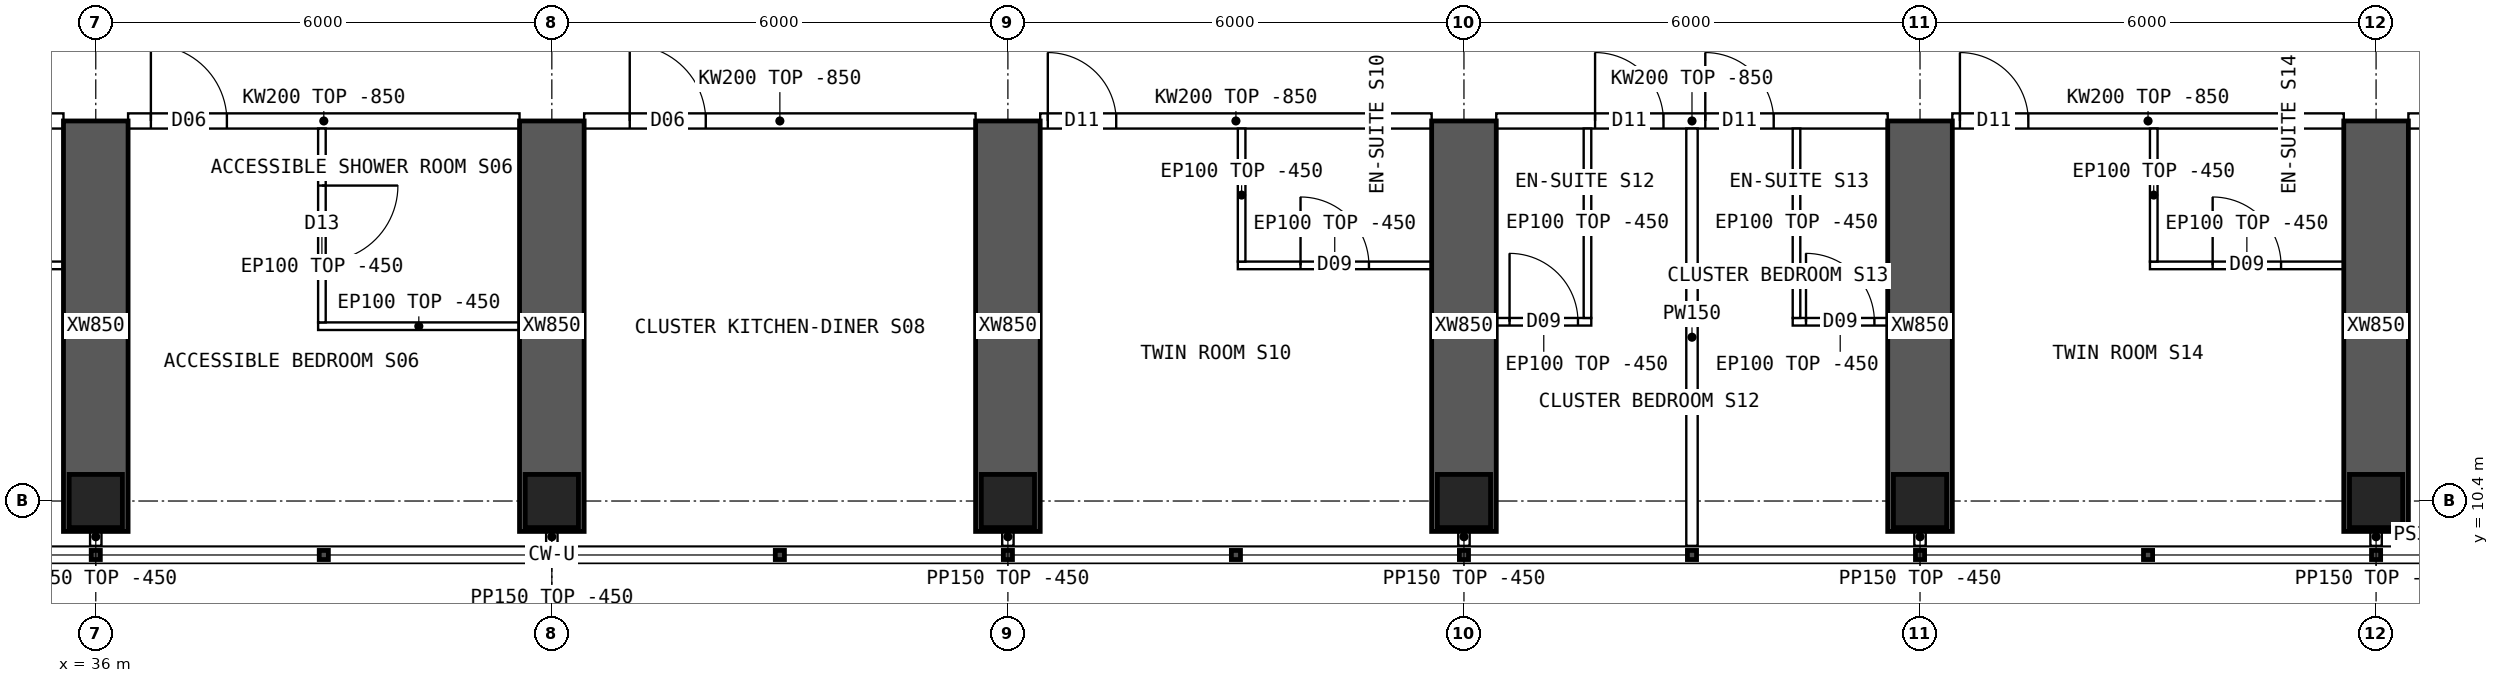
"""IFC4 building model, lengths in metres.
Left out: names, types, materials, properties, quantities, classifications, styles, units other than length and angle.
Written with IfcOpenShell. Run it as: python <this file> out.ifc"""

import sys

from ifc_helpers import new_model, si_unit, direction, frame, frame_2d, origin, origin_2d, place, context, subcontext, project, spatial, polyline, rectangle, hollow_rectangle, outline, extrude, element, fill, save


model = new_model("IFC4")
c1 = context("Model", 3, precision=1e-05, world=origin(), true_north=direction((0.0, 1.0)))
c2 = subcontext(c1, "Body", "Model", "MODEL_VIEW")
j1 = project(units=[si_unit("LENGTHUNIT", "METRE"), si_unit("PLANEANGLEUNIT", "RADIAN")], contexts=[c1])
p1 = place(None, origin())
s1 = spatial("IfcSite", under=j1, at=p1, CompositionType="ELEMENT")
p2 = place(p1, origin())
s2 = spatial("IfcBuilding", under=s1, at=p2, CompositionType="ELEMENT")
p3 = place(p2, frame((0.0, 0.0, 189.85)))
s3 = spatial("IfcBuildingStorey", under=s2, at=p3, CompositionType="ELEMENT", Elevation=189.85)
for number, where, z_axis, x_axis in (
    (1, (36.0, 10.4, 0.0), (0.0, 0.0, 1.0), (1.0, 0.0, 0.0)),
    (2, (42.0, 10.4, 0.0), (0.0, 0.0, 1.0), (1.0, 0.0, 0.0)),
    (3, (48.0, 10.4, 0.0), (0.0, 0.0, 1.0), (1.0, 0.0, 0.0)),
    (4, (54.0, 10.4, 0.0), (0.0, 0.0, 1.0), (1.0, 0.0, 0.0)),
    (5, (60.0, 10.4, 0.0), (0.0, 0.0, 1.0), (1.0, 0.0, 0.0)),
    (6, (66.0, 10.4, 0.0), (0.0, 0.0, 1.0), (1.0, 0.0, 0.0)),
):
    element("IfcColumn", number, at=place(p3, frame(where, z_axis=z_axis, x_axis=x_axis)), inside=s3, PredefinedType="COLUMN", context=c2, shape_type="SweptSolid", body=[
        extrude(hollow_rectangle(XDim=0.7, YDim=0.7, WallThickness=0.07, at=origin_2d()), origin(), (0.0, 0.0, 1.0), 3.75),
    ])
for number, where, z_axis, x_axis in (
    (7, (36.0, 10.0, 0.0), (0.0, 0.0, 1.0), (0.0, 1.0, 0.0)),
    (8, (42.0, 10.0, 0.0), (0.0, 0.0, 1.0), (0.0, 1.0, 0.0)),
    (9, (48.0, 10.0, 0.0), (0.0, 0.0, 1.0), (0.0, 1.0, 0.0)),
    (10, (54.0, 10.0, 0.0), (0.0, 0.0, 1.0), (0.0, 1.0, 0.0)),
    (11, (60.0, 10.0, 0.0), (0.0, 0.0, 1.0), (0.0, 1.0, 0.0)),
    (12, (66.0, 10.0, 0.0), (0.0, 0.0, 1.0), (0.0, 1.0, 0.0)),
):
    element("IfcWall", number, at=place(p3, frame(where, z_axis=z_axis, x_axis=x_axis)), inside=s3, PredefinedType="SHEAR", context=c2, shape_type="SweptSolid", body=[
        extrude(rectangle(XDim=5.4, YDim=0.85, at=frame_2d((2.7, 0.0))), origin(), (0.0, 0.0, 1.0), 3.75),
    ])
p4 = place(p3, frame((66.8, 9.95, 0.0), z_axis=(0.0, 0.0, 1.0), x_axis=(-1.0, 0.0, 0.0)))
e13 = element("IfcWall", 13, at=p4, inside=s3, PredefinedType="SOLIDWALL", context=c2, shape_type="SweptSolid", body=[
    extrude(rectangle(XDim=0.375, YDim=0.3, at=frame_2d((0.188, 0.0))), origin(), (0.0, 0.0, 1.0), 3.3),
])
p5 = place(p3, frame((30.425, 15.4, 0.0), z_axis=(0.0, 0.0, 1.0), x_axis=(1.0, 0.0, 0.0)))
e14 = element("IfcWall", 14, at=p5, inside=s3, PredefinedType="SOLIDWALL", context=c2, shape_type="SweptSolid", body=[
    extrude(outline(polyline([(0.0, 0.0), (5.15, 0.0), (5.15, 2.9), (0.0, 2.9), (0.0, 0.0)])), frame((0.0, 0.1, 0.0), z_axis=(0.0, -1.0, 0.0), x_axis=(1.0, 0.0, 0.0)), (0.0, 0.0, 1.0), 0.2),
])
p6 = place(p5, frame((0.1, 0.0, 0.0)))
e15 = element("IfcOpeningElement", 15, at=p6, cuts=e14, PredefinedType="OPENING", context=c2, shape_type="SweptSolid", body=[
    extrude(rectangle(XDim=0.9, YDim=2.1, at=frame_2d((0.45, 1.05))), frame((0.0, 0.11, 0.0), z_axis=(0.0, -1.0, 0.0), x_axis=(1.0, 0.0, 0.0)), (0.0, 0.0, 1.0), 0.22),
])
p7 = place(p3, frame((36.425, 15.4, 0.0), z_axis=(0.0, 0.0, 1.0), x_axis=(1.0, 0.0, 0.0)))
e16 = element("IfcWall", 16, at=p7, inside=s3, PredefinedType="SOLIDWALL", context=c2, shape_type="SweptSolid", body=[
    extrude(outline(polyline([(0.0, 0.0), (5.15, 0.0), (5.15, 2.9), (0.0, 2.9), (0.0, 0.0)])), frame((0.0, 0.1, 0.0), z_axis=(0.0, -1.0, 0.0), x_axis=(1.0, 0.0, 0.0)), (0.0, 0.0, 1.0), 0.2),
])
p8 = place(p7, frame((0.3, 0.0, 0.0)))
e17 = element("IfcOpeningElement", 17, at=p8, cuts=e16, PredefinedType="OPENING", context=c2, shape_type="SweptSolid", body=[
    extrude(rectangle(XDim=1.0, YDim=2.1, at=frame_2d((0.5, 1.05))), frame((0.0, 0.11, 0.0), z_axis=(0.0, -1.0, 0.0), x_axis=(1.0, 0.0, 0.0)), (0.0, 0.0, 1.0), 0.22),
])
p9 = place(p3, frame((42.425, 15.4, 0.0), z_axis=(0.0, 0.0, 1.0), x_axis=(1.0, 0.0, 0.0)))
e18 = element("IfcWall", 18, at=p9, inside=s3, PredefinedType="SOLIDWALL", context=c2, shape_type="SweptSolid", body=[
    extrude(outline(polyline([(0.0, 0.0), (5.15, 0.0), (5.15, 2.9), (0.0, 2.9), (0.0, 0.0)])), frame((0.0, 0.1, 0.0), z_axis=(0.0, -1.0, 0.0), x_axis=(1.0, 0.0, 0.0)), (0.0, 0.0, 1.0), 0.2),
])
p10 = place(p9, frame((0.6, 0.0, 0.0)))
e19 = element("IfcOpeningElement", 19, at=p10, cuts=e18, PredefinedType="OPENING", context=c2, shape_type="SweptSolid", body=[
    extrude(rectangle(XDim=1.0, YDim=2.1, at=frame_2d((0.5, 1.05))), frame((0.0, 0.11, 0.0), z_axis=(0.0, -1.0, 0.0), x_axis=(1.0, 0.0, 0.0)), (0.0, 0.0, 1.0), 0.22),
])
p11 = place(p3, frame((48.425, 15.4, 0.0), z_axis=(0.0, 0.0, 1.0), x_axis=(1.0, 0.0, 0.0)))
e20 = element("IfcWall", 20, at=p11, inside=s3, PredefinedType="SOLIDWALL", context=c2, shape_type="SweptSolid", body=[
    extrude(outline(polyline([(0.0, 0.0), (5.15, 0.0), (5.15, 2.9), (0.0, 2.9), (0.0, 0.0)])), frame((0.0, 0.1, 0.0), z_axis=(0.0, -1.0, 0.0), x_axis=(1.0, 0.0, 0.0)), (0.0, 0.0, 1.0), 0.2),
])
p12 = place(p11, frame((0.1, 0.0, 0.0)))
e21 = element("IfcOpeningElement", 21, at=p12, cuts=e20, PredefinedType="OPENING", context=c2, shape_type="SweptSolid", body=[
    extrude(rectangle(XDim=0.9, YDim=2.1, at=frame_2d((0.45, 1.05))), frame((0.0, 0.11, 0.0), z_axis=(0.0, -1.0, 0.0), x_axis=(1.0, 0.0, 0.0)), (0.0, 0.0, 1.0), 0.22),
])
p13 = place(p3, frame((54.425, 15.4, 0.0), z_axis=(0.0, 0.0, 1.0), x_axis=(1.0, 0.0, 0.0)))
e22 = element("IfcWall", 22, at=p13, inside=s3, PredefinedType="SOLIDWALL", context=c2, shape_type="SweptSolid", body=[
    extrude(outline(polyline([(0.0, 0.0), (5.15, 0.0), (5.15, 2.9), (0.0, 2.9), (0.0, 0.0)])), frame((0.0, 0.1, 0.0), z_axis=(0.0, -1.0, 0.0), x_axis=(1.0, 0.0, 0.0)), (0.0, 0.0, 1.0), 0.2),
])
p14 = place(p13, frame((1.3, 0.0, 0.0)))
e23 = element("IfcOpeningElement", 23, at=p14, cuts=e22, PredefinedType="OPENING", context=c2, shape_type="SweptSolid", body=[
    extrude(rectangle(XDim=0.9, YDim=2.1, at=frame_2d((0.45, 1.05))), frame((0.0, 0.11, 0.0), z_axis=(0.0, -1.0, 0.0), x_axis=(1.0, 0.0, 0.0)), (0.0, 0.0, 1.0), 0.22),
])
p15 = place(p13, frame((2.75, 0.0, 0.0)))
e24 = element("IfcOpeningElement", 24, at=p15, cuts=e22, PredefinedType="OPENING", context=c2, shape_type="SweptSolid", body=[
    extrude(rectangle(XDim=0.9, YDim=2.1, at=frame_2d((0.45, 1.05))), frame((0.0, 0.11, 0.0), z_axis=(0.0, -1.0, 0.0), x_axis=(1.0, 0.0, 0.0)), (0.0, 0.0, 1.0), 0.22),
])
p16 = place(p3, frame((60.425, 15.4, 0.0), z_axis=(0.0, 0.0, 1.0), x_axis=(1.0, 0.0, 0.0)))
e25 = element("IfcWall", 25, at=p16, inside=s3, PredefinedType="SOLIDWALL", context=c2, shape_type="SweptSolid", body=[
    extrude(outline(polyline([(0.0, 0.0), (5.15, 0.0), (5.15, 2.9), (0.0, 2.9), (0.0, 0.0)])), frame((0.0, 0.1, 0.0), z_axis=(0.0, -1.0, 0.0), x_axis=(1.0, 0.0, 0.0)), (0.0, 0.0, 1.0), 0.2),
])
p17 = place(p16, frame((0.1, 0.0, 0.0)))
e26 = element("IfcOpeningElement", 26, at=p17, cuts=e25, PredefinedType="OPENING", context=c2, shape_type="SweptSolid", body=[
    extrude(rectangle(XDim=0.9, YDim=2.1, at=frame_2d((0.45, 1.05))), frame((0.0, 0.11, 0.0), z_axis=(0.0, -1.0, 0.0), x_axis=(1.0, 0.0, 0.0)), (0.0, 0.0, 1.0), 0.22),
])
p18 = place(p3, frame((66.425, 15.4, 0.0), z_axis=(0.0, 0.0, 1.0), x_axis=(1.0, 0.0, 0.0)))
e27 = element("IfcWall", 27, at=p18, inside=s3, PredefinedType="SOLIDWALL", context=c2, shape_type="SweptSolid", body=[
    extrude(rectangle(XDim=1.975, YDim=0.2, at=frame_2d((0.987, 0.0))), origin(), (0.0, 0.0, 1.0), 3.3),
])
p19 = place(p18, frame((0.2, 0.0, 0.0)))
e28 = element("IfcOpeningElement", 28, at=p19, cuts=e27, PredefinedType="OPENING", context=c2, shape_type="SweptSolid", body=[
    extrude(rectangle(XDim=0.9, YDim=2.1, at=frame_2d((0.45, 1.05))), frame((0.0, 0.11, 0.0), z_axis=(0.0, -1.0, 0.0), x_axis=(1.0, 0.0, 0.0)), (0.0, 0.0, 1.0), 0.22),
])
p20 = place(p3, frame((35.575, 13.5, 0.0), z_axis=(0.0, 0.0, 1.0), x_axis=(-1.0, 0.0, 0.0)))
e29 = element("IfcWall", 29, at=p20, inside=s3, PredefinedType="PARTITIONING", context=c2, shape_type="SweptSolid", body=[
    extrude(rectangle(XDim=2.55, YDim=0.1, at=frame_2d((1.275, 0.0))), origin(), (0.0, 0.0, 1.0), 3.3),
])
p21 = place(p20, frame((0.825, 0.0, 0.0)))
e30 = element("IfcOpeningElement", 30, at=p21, cuts=e29, PredefinedType="OPENING", context=c2, shape_type="SweptSolid", body=[
    extrude(rectangle(XDim=0.9, YDim=2.1, at=frame_2d((0.45, 1.05))), frame((0.0, 0.06, 0.0), z_axis=(0.0, -1.0, 0.0), x_axis=(1.0, 0.0, 0.0)), (0.0, 0.0, 1.0), 0.12),
])
p22 = place(p3, frame((38.925, 12.7, 0.0), z_axis=(0.0, 0.0, 1.0), x_axis=(1.0, 0.0, 0.0)))
e31 = element("IfcWall", 31, at=p22, inside=s3, PredefinedType="PARTITIONING", context=c2, shape_type="SweptSolid", body=[
    extrude(rectangle(XDim=2.65, YDim=0.1, at=frame_2d((1.325, 0.0))), origin(), (0.0, 0.0, 1.0), 3.3),
])
p23 = place(p3, frame((38.975, 12.75, 0.0), z_axis=(0.0, 0.0, 1.0), x_axis=(0.0, 1.0, 0.0)))
e32 = element("IfcWall", 32, at=p23, inside=s3, PredefinedType="PARTITIONING", context=c2, shape_type="SweptSolid", body=[
    extrude(outline(polyline([(0.0, 0.0), (2.55, 0.0), (2.55, 2.9), (2.502, 2.9), (2.5, 3.3), (0.0, 3.3), (0.0, 0.0)])), frame((0.0, 0.05, 0.0), z_axis=(0.0, -1.0, 0.0), x_axis=(1.0, 0.0, 0.0)), (0.0, 0.0, 1.0), 0.1),
])
p24 = place(p23, frame((0.8, 0.0, 0.0)))
e33 = element("IfcOpeningElement", 33, at=p24, cuts=e32, PredefinedType="OPENING", context=c2, shape_type="SweptSolid", body=[
    extrude(rectangle(XDim=1.0, YDim=2.1, at=frame_2d((0.5, 1.05))), frame((0.0, 0.06, 0.0), z_axis=(0.0, -1.0, 0.0), x_axis=(1.0, 0.0, 0.0)), (0.0, 0.0, 1.0), 0.12),
])
p25 = place(p3, frame((53.575, 13.5, 0.0), z_axis=(0.0, 0.0, 1.0), x_axis=(-1.0, 0.0, 0.0)))
e34 = element("IfcWall", 34, at=p25, inside=s3, PredefinedType="PARTITIONING", context=c2, shape_type="SweptSolid", body=[
    extrude(rectangle(XDim=2.55, YDim=0.1, at=frame_2d((1.275, 0.0))), origin(), (0.0, 0.0, 1.0), 3.3),
])
p26 = place(p25, frame((0.825, 0.0, 0.0)))
e35 = element("IfcOpeningElement", 35, at=p26, cuts=e34, PredefinedType="OPENING", context=c2, shape_type="SweptSolid", body=[
    extrude(rectangle(XDim=0.9, YDim=2.1, at=frame_2d((0.45, 1.05))), frame((0.0, 0.06, 0.0), z_axis=(0.0, -1.0, 0.0), x_axis=(1.0, 0.0, 0.0)), (0.0, 0.0, 1.0), 0.12),
])
p27 = place(p3, frame((51.075, 13.55, 0.0), z_axis=(0.0, 0.0, 1.0), x_axis=(0.0, 1.0, 0.0)))
e36 = element("IfcWall", 36, at=p27, inside=s3, PredefinedType="PARTITIONING", context=c2, shape_type="SweptSolid", body=[
    extrude(outline(polyline([(0.0, 0.0), (1.75, 0.0), (1.75, 2.9), (1.702, 2.9), (1.7, 3.3), (0.0, 3.3), (0.0, 0.0)])), frame((0.0, 0.05, 0.0), z_axis=(0.0, -1.0, 0.0), x_axis=(1.0, 0.0, 0.0)), (0.0, 0.0, 1.0), 0.1),
])
p28 = place(p3, frame((57.0, 9.81, 0.0), z_axis=(0.0, 0.0, 1.0), x_axis=(0.0, 1.0, 0.0)))
e37 = element("IfcWall", 37, at=p28, inside=s3, PredefinedType="PARTITIONING", context=c2, shape_type="SweptSolid", body=[
    extrude(outline(polyline([(0.0, 0.0), (5.49, 0.0), (5.49, 2.9), (5.442, 2.9), (5.44, 3.3), (0.792, 3.3), (0.79, 2.9), (0.392, 2.9), (0.39, 3.3), (0.0, 3.3), (0.0, 0.0)])), frame((0.0, 0.075, 0.0), z_axis=(0.0, -1.0, 0.0), x_axis=(1.0, 0.0, 0.0)), (0.0, 0.0, 1.0), 0.15),
])
p29 = place(p3, frame((55.675, 12.758, 0.0), z_axis=(0.0, 0.0, 1.0), x_axis=(-1.0, 0.0, 0.0)))
e38 = element("IfcWall", 38, at=p29, inside=s3, PredefinedType="PARTITIONING", context=c2, shape_type="SweptSolid", body=[
    extrude(rectangle(XDim=1.25, YDim=0.1, at=frame_2d((0.625, 0.0))), origin(), (0.0, 0.0, 1.0), 3.3),
])
p30 = place(p29, frame((0.175, 0.0, 0.0)))
e39 = element("IfcOpeningElement", 39, at=p30, cuts=e38, PredefinedType="OPENING", context=c2, shape_type="SweptSolid", body=[
    extrude(rectangle(XDim=0.9, YDim=2.1, at=frame_2d((0.45, 1.05))), frame((0.0, 0.06, 0.0), z_axis=(0.0, -1.0, 0.0), x_axis=(1.0, 0.0, 0.0)), (0.0, 0.0, 1.0), 0.12),
])
p31 = place(p3, frame((55.625, 12.808, 0.0), z_axis=(0.0, 0.0, 1.0), x_axis=(0.0, 1.0, 0.0)))
e40 = element("IfcWall", 40, at=p31, inside=s3, PredefinedType="PARTITIONING", context=c2, shape_type="SweptSolid", body=[
    extrude(outline(polyline([(0.0, 0.0), (2.492, 0.0), (2.492, 2.9), (2.444, 2.9), (2.442, 3.3), (0.0, 3.3), (0.0, 0.0)])), frame((0.0, 0.05, 0.0), z_axis=(0.0, -1.0, 0.0), x_axis=(1.0, 0.0, 0.0)), (0.0, 0.0, 1.0), 0.1),
])
p32 = place(p3, frame((59.575, 12.758, 0.0), z_axis=(0.0, 0.0, 1.0), x_axis=(-1.0, 0.0, 0.0)))
e41 = element("IfcWall", 41, at=p32, inside=s3, PredefinedType="PARTITIONING", context=c2, shape_type="SweptSolid", body=[
    extrude(rectangle(XDim=1.25, YDim=0.1, at=frame_2d((0.625, 0.0))), origin(), (0.0, 0.0, 1.0), 3.3),
])
p33 = place(p32, frame((0.175, 0.0, 0.0)))
e42 = element("IfcOpeningElement", 42, at=p33, cuts=e41, PredefinedType="OPENING", context=c2, shape_type="SweptSolid", body=[
    extrude(rectangle(XDim=0.9, YDim=2.1, at=frame_2d((0.45, 1.05))), frame((0.0, 0.06, 0.0), z_axis=(0.0, -1.0, 0.0), x_axis=(1.0, 0.0, 0.0)), (0.0, 0.0, 1.0), 0.12),
])
p34 = place(p3, frame((58.375, 12.808, 0.0), z_axis=(0.0, 0.0, 1.0), x_axis=(0.0, 1.0, 0.0)))
e43 = element("IfcWall", 43, at=p34, inside=s3, PredefinedType="PARTITIONING", context=c2, shape_type="SweptSolid", body=[
    extrude(outline(polyline([(0.0, 0.0), (2.492, 0.0), (2.492, 2.9), (2.444, 2.9), (2.442, 3.3), (0.0, 3.3), (0.0, 0.0)])), frame((0.0, 0.05, 0.0), z_axis=(0.0, -1.0, 0.0), x_axis=(1.0, 0.0, 0.0)), (0.0, 0.0, 1.0), 0.1),
])
p35 = place(p3, frame((65.575, 13.5, 0.0), z_axis=(0.0, 0.0, 1.0), x_axis=(-1.0, 0.0, 0.0)))
e44 = element("IfcWall", 44, at=p35, inside=s3, PredefinedType="PARTITIONING", context=c2, shape_type="SweptSolid", body=[
    extrude(rectangle(XDim=2.55, YDim=0.1, at=frame_2d((1.275, 0.0))), origin(), (0.0, 0.0, 1.0), 3.3),
])
p36 = place(p35, frame((0.825, 0.0, 0.0)))
e45 = element("IfcOpeningElement", 45, at=p36, cuts=e44, PredefinedType="OPENING", context=c2, shape_type="SweptSolid", body=[
    extrude(rectangle(XDim=0.9, YDim=2.1, at=frame_2d((0.45, 1.05))), frame((0.0, 0.06, 0.0), z_axis=(0.0, -1.0, 0.0), x_axis=(1.0, 0.0, 0.0)), (0.0, 0.0, 1.0), 0.12),
])
p37 = place(p3, frame((63.075, 13.55, 0.0), z_axis=(0.0, 0.0, 1.0), x_axis=(0.0, 1.0, 0.0)))
e46 = element("IfcWall", 46, at=p37, inside=s3, PredefinedType="PARTITIONING", context=c2, shape_type="SweptSolid", body=[
    extrude(outline(polyline([(0.0, 0.0), (1.75, 0.0), (1.75, 2.9), (1.702, 2.9), (1.7, 3.3), (0.0, 3.3), (0.0, 0.0)])), frame((0.0, 0.05, 0.0), z_axis=(0.0, -1.0, 0.0), x_axis=(1.0, 0.0, 0.0)), (0.0, 0.0, 1.0), 0.1),
])
for number, where, z_axis, x_axis in (
    (47, (36.0, 10.05, 0.0), (0.0, 0.0, 1.0), (0.0, -1.0, 0.0)),
    (48, (42.0, 10.05, 0.0), (0.0, 0.0, 1.0), (0.0, -1.0, 0.0)),
    (49, (48.0, 10.05, 0.0), (0.0, 0.0, 1.0), (0.0, -1.0, 0.0)),
    (50, (54.0, 10.05, 0.0), (0.0, 0.0, 1.0), (0.0, -1.0, 0.0)),
    (51, (60.0, 10.05, 0.0), (0.0, 0.0, 1.0), (0.0, -1.0, 0.0)),
    (52, (66.0, 10.05, 0.0), (0.0, 0.0, 1.0), (0.0, -1.0, 0.0)),
):
    element("IfcWall", number, at=place(p3, frame(where, z_axis=z_axis, x_axis=x_axis)), inside=s3, PredefinedType="PARTITIONING", context=c2, shape_type="SweptSolid", body=[
        extrude(rectangle(XDim=0.24, YDim=0.15, at=frame_2d((0.12, 0.0))), origin(), (0.0, 0.0, 1.0), 3.3),
    ])
p38 = place(p24, origin())
e53 = element("IfcDoor", 53, at=p38, inside=s3, OperationType="SINGLE_SWING_RIGHT", PredefinedType="DOOR", context=c2, shape_type="SweptSolid", body=[
    extrude(rectangle(XDim=1.0, YDim=2.1, at=frame_2d((0.5, 1.05))), frame((0.0, 0.025, 0.0), z_axis=(0.0, -1.0, 0.0), x_axis=(1.0, 0.0, 0.0)), (0.0, 0.0, 1.0), 0.05),
])
fill(e33, e53)
p39 = place(p8, origin())
e54 = element("IfcDoor", 54, at=p39, inside=s3, OperationType="SINGLE_SWING_LEFT", PredefinedType="DOOR", context=c2, shape_type="SweptSolid", body=[
    extrude(rectangle(XDim=1.0, YDim=2.1, at=frame_2d((0.5, 1.05))), frame((0.0, 0.025, 0.0), z_axis=(0.0, -1.0, 0.0), x_axis=(1.0, 0.0, 0.0)), (0.0, 0.0, 1.0), 0.05),
])
fill(e17, e54)
p40 = place(p10, origin())
e55 = element("IfcDoor", 55, at=p40, inside=s3, OperationType="SINGLE_SWING_LEFT", PredefinedType="DOOR", context=c2, shape_type="SweptSolid", body=[
    extrude(rectangle(XDim=1.0, YDim=2.1, at=frame_2d((0.5, 1.05))), frame((0.0, 0.025, 0.0), z_axis=(0.0, -1.0, 0.0), x_axis=(1.0, 0.0, 0.0)), (0.0, 0.0, 1.0), 0.05),
])
fill(e19, e55)
p41 = place(p26, origin())
e56 = element("IfcDoor", 56, at=p41, inside=s3, OperationType="SINGLE_SWING_RIGHT", PredefinedType="DOOR", context=c2, shape_type="SweptSolid", body=[
    extrude(rectangle(XDim=0.9, YDim=2.1, at=frame_2d((0.45, 1.05))), frame((0.0, 0.025, 0.0), z_axis=(0.0, -1.0, 0.0), x_axis=(1.0, 0.0, 0.0)), (0.0, 0.0, 1.0), 0.05),
])
fill(e35, e56)
p42 = place(p12, origin())
e57 = element("IfcDoor", 57, at=p42, inside=s3, OperationType="SINGLE_SWING_LEFT", PredefinedType="DOOR", context=c2, shape_type="SweptSolid", body=[
    extrude(rectangle(XDim=0.9, YDim=2.1, at=frame_2d((0.45, 1.05))), frame((0.0, 0.025, 0.0), z_axis=(0.0, -1.0, 0.0), x_axis=(1.0, 0.0, 0.0)), (0.0, 0.0, 1.0), 0.05),
])
fill(e21, e57)
p43 = place(p30, origin())
e58 = element("IfcDoor", 58, at=p43, inside=s3, OperationType="SINGLE_SWING_RIGHT", PredefinedType="DOOR", context=c2, shape_type="SweptSolid", body=[
    extrude(rectangle(XDim=0.9, YDim=2.1, at=frame_2d((0.45, 1.05))), frame((0.0, 0.025, 0.0), z_axis=(0.0, -1.0, 0.0), x_axis=(1.0, 0.0, 0.0)), (0.0, 0.0, 1.0), 0.05),
])
fill(e39, e58)
p44 = place(p14, origin())
e59 = element("IfcDoor", 59, at=p44, inside=s3, OperationType="SINGLE_SWING_LEFT", PredefinedType="DOOR", context=c2, shape_type="SweptSolid", body=[
    extrude(rectangle(XDim=0.9, YDim=2.1, at=frame_2d((0.45, 1.05))), frame((0.0, 0.025, 0.0), z_axis=(0.0, -1.0, 0.0), x_axis=(1.0, 0.0, 0.0)), (0.0, 0.0, 1.0), 0.05),
])
fill(e23, e59)
p45 = place(p33, origin())
e60 = element("IfcDoor", 60, at=p45, inside=s3, OperationType="SINGLE_SWING_RIGHT", PredefinedType="DOOR", context=c2, shape_type="SweptSolid", body=[
    extrude(rectangle(XDim=0.9, YDim=2.1, at=frame_2d((0.45, 1.05))), frame((0.0, 0.025, 0.0), z_axis=(0.0, -1.0, 0.0), x_axis=(1.0, 0.0, 0.0)), (0.0, 0.0, 1.0), 0.05),
])
fill(e42, e60)
p46 = place(p15, origin())
e61 = element("IfcDoor", 61, at=p46, inside=s3, OperationType="SINGLE_SWING_LEFT", PredefinedType="DOOR", context=c2, shape_type="SweptSolid", body=[
    extrude(rectangle(XDim=0.9, YDim=2.1, at=frame_2d((0.45, 1.05))), frame((0.0, 0.025, 0.0), z_axis=(0.0, -1.0, 0.0), x_axis=(1.0, 0.0, 0.0)), (0.0, 0.0, 1.0), 0.05),
])
fill(e24, e61)
p47 = place(p36, origin())
e62 = element("IfcDoor", 62, at=p47, inside=s3, OperationType="SINGLE_SWING_RIGHT", PredefinedType="DOOR", context=c2, shape_type="SweptSolid", body=[
    extrude(rectangle(XDim=0.9, YDim=2.1, at=frame_2d((0.45, 1.05))), frame((0.0, 0.025, 0.0), z_axis=(0.0, -1.0, 0.0), x_axis=(1.0, 0.0, 0.0)), (0.0, 0.0, 1.0), 0.05),
])
fill(e45, e62)
p48 = place(p17, origin())
e63 = element("IfcDoor", 63, at=p48, inside=s3, OperationType="SINGLE_SWING_LEFT", PredefinedType="DOOR", context=c2, shape_type="SweptSolid", body=[
    extrude(rectangle(XDim=0.9, YDim=2.1, at=frame_2d((0.45, 1.05))), frame((0.0, 0.025, 0.0), z_axis=(0.0, -1.0, 0.0), x_axis=(1.0, 0.0, 0.0)), (0.0, 0.0, 1.0), 0.05),
])
fill(e26, e63)
save(model, sys.argv[1])
